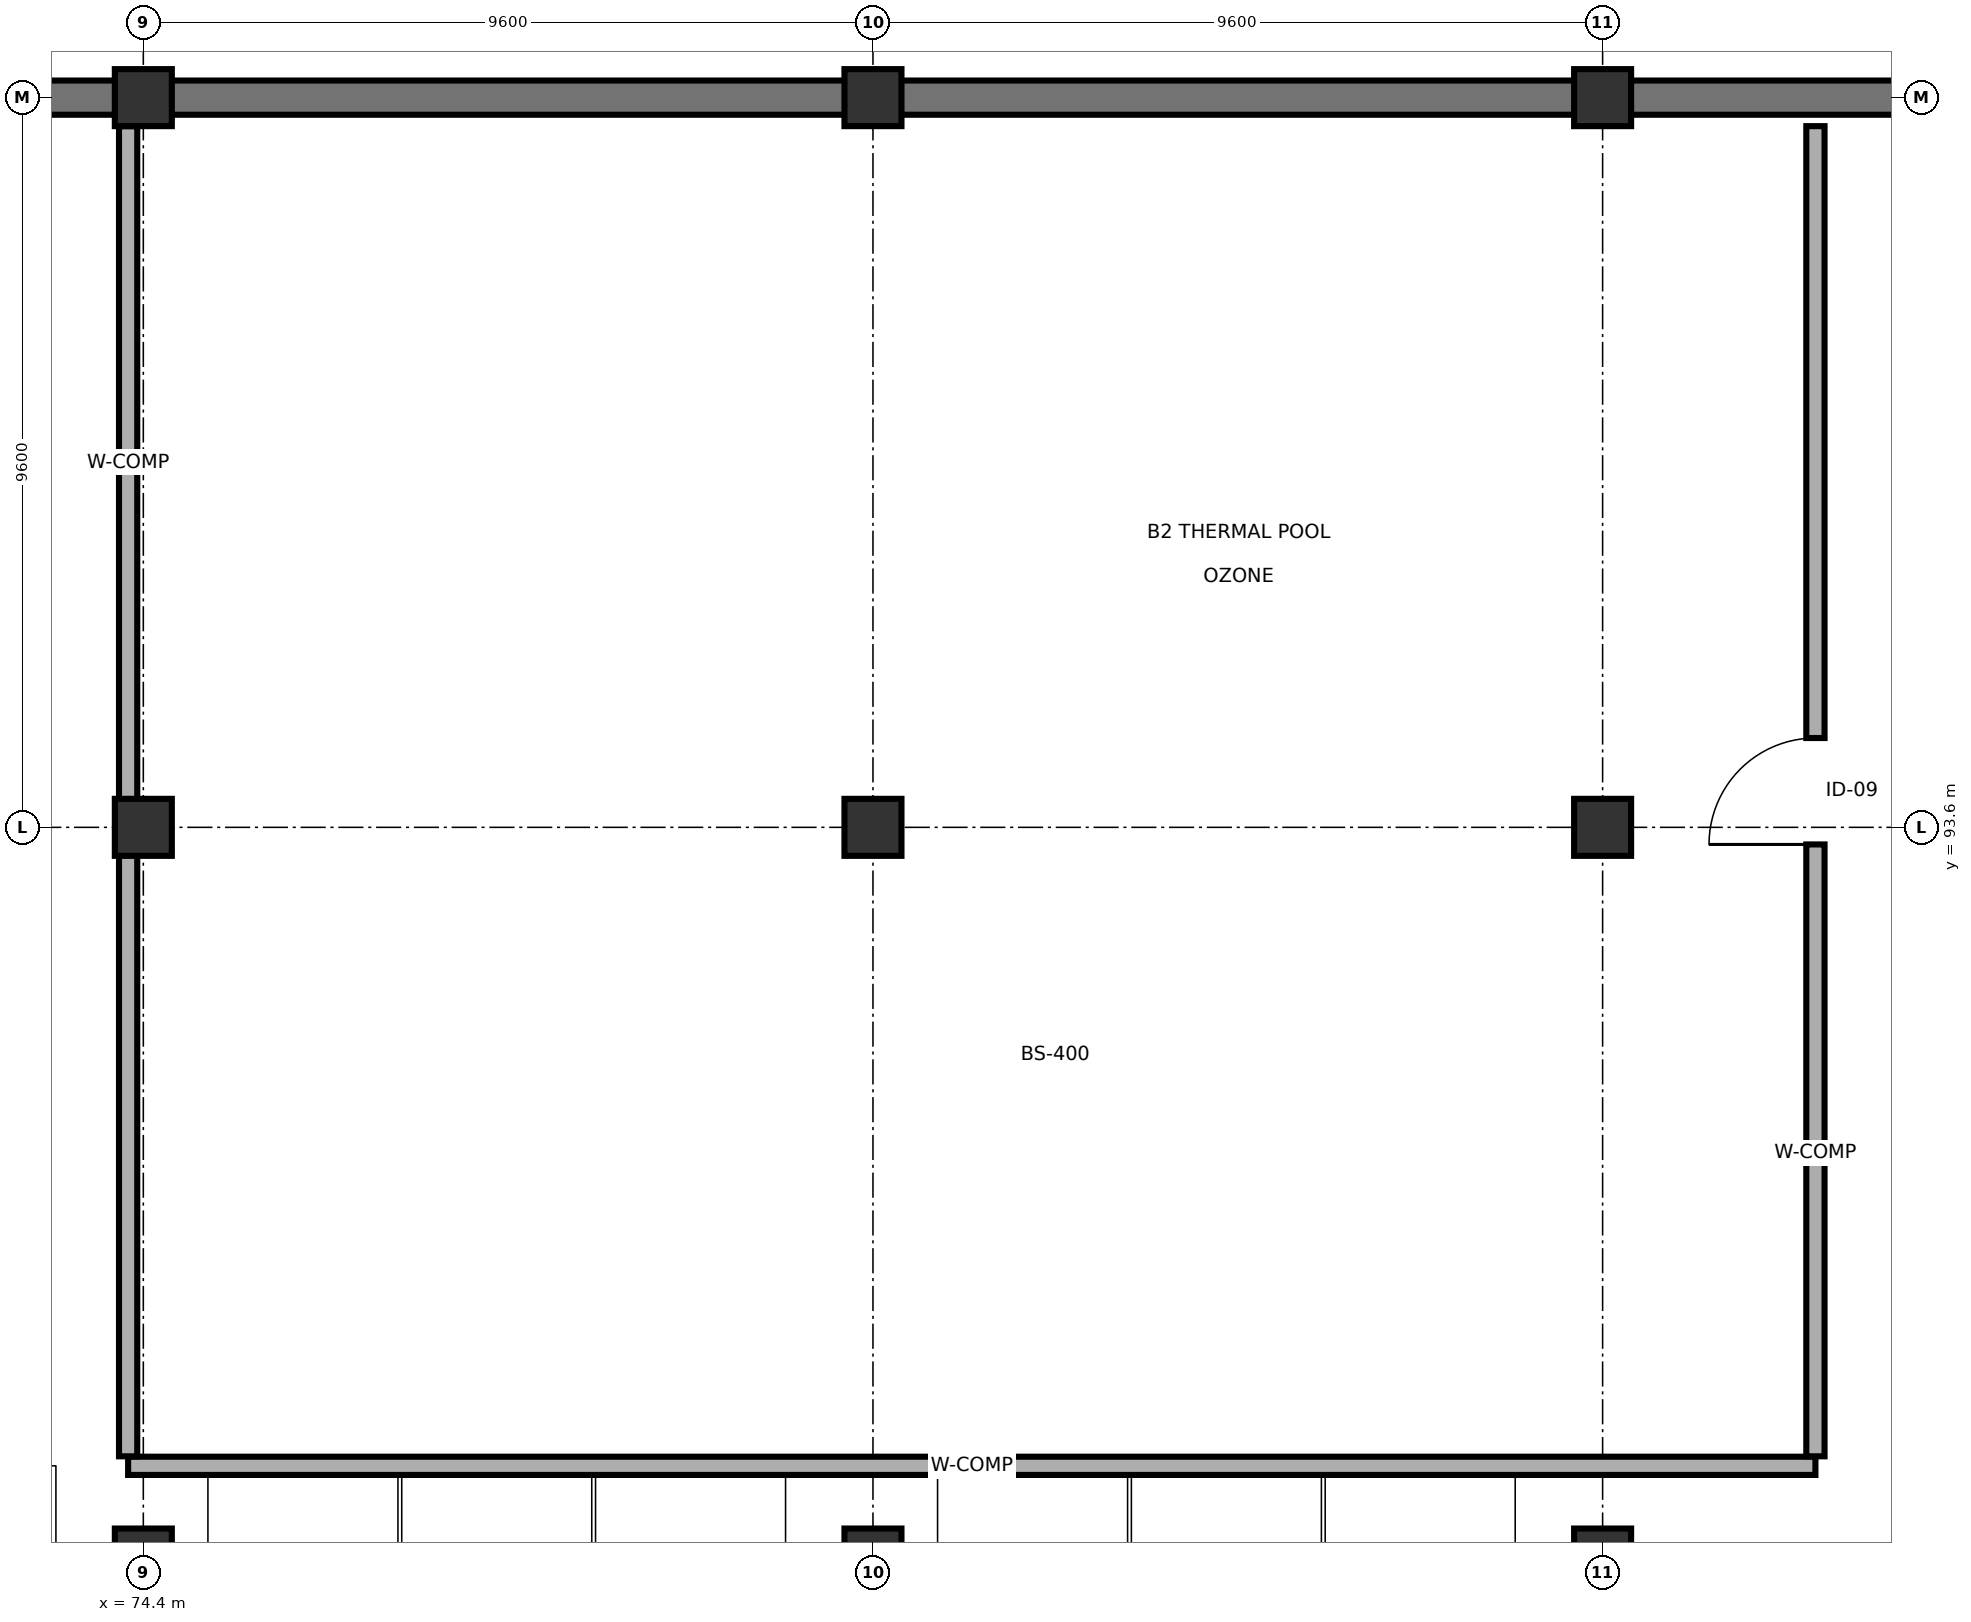
"""IFC4 building model, lengths in metres.
Left out: names, types, materials, properties, quantities, classifications, styles, units other than length and angle.
Written with IfcOpenShell. Run it as: python <this file> out.ifc"""

import sys

from ifc_helpers import new_model, si_unit, direction, frame, frame_2d, origin, origin_2d, place, context, subcontext, project, spatial, rectangle, extrude, element, fill, save


model = new_model("IFC4")
c1 = context("Model", 3, precision=1e-05, world=origin(), true_north=direction((0.0, 1.0)))
c2 = subcontext(c1, "Body", "Model", "MODEL_VIEW")
j1 = project(units=[si_unit("LENGTHUNIT", "METRE"), si_unit("PLANEANGLEUNIT", "RADIAN")], contexts=[c1])
p1 = place(None, origin())
s1 = spatial("IfcSite", under=j1, at=p1, CompositionType="ELEMENT")
p2 = place(p1, origin())
s2 = spatial("IfcBuilding", under=s1, at=p2, CompositionType="ELEMENT")
p3 = place(p2, frame((0.0, 0.0, -8.4)))
s3 = spatial("IfcBuildingStorey", under=s2, at=p3, CompositionType="ELEMENT", Elevation=-8.4)
for number, where, z_axis, x_axis in (
    (1, (74.4, 84.0, 0.0), (0.0, 0.0, 1.0), (1.0, 0.0, 0.0)),
    (2, (74.4, 93.6, 0.0), (0.0, 0.0, 1.0), (1.0, 0.0, 0.0)),
    (3, (74.4, 103.2, 0.0), (0.0, 0.0, 1.0), (1.0, 0.0, 0.0)),
    (4, (84.0, 84.0, 0.0), (0.0, 0.0, 1.0), (1.0, 0.0, 0.0)),
    (5, (84.0, 93.6, 0.0), (0.0, 0.0, 1.0), (1.0, 0.0, 0.0)),
    (6, (84.0, 103.2, 0.0), (0.0, 0.0, 1.0), (1.0, 0.0, 0.0)),
    (7, (93.6, 84.0, 0.0), (0.0, 0.0, 1.0), (1.0, 0.0, 0.0)),
    (8, (93.6, 93.6, 0.0), (0.0, 0.0, 1.0), (1.0, 0.0, 0.0)),
    (9, (93.6, 103.2, 0.0), (0.0, 0.0, 1.0), (1.0, 0.0, 0.0)),
):
    element("IfcColumn", number, at=place(p3, frame(where, z_axis=z_axis, x_axis=x_axis)), inside=s3, PredefinedType="COLUMN", context=c2, shape_type="SweptSolid", body=[
        extrude(rectangle(XDim=0.75, YDim=0.75, at=origin_2d()), origin(), (0.0, 0.0, 1.0), 4.2),
    ])
p4 = place(p3, frame((117.1, 103.2, 0.0), z_axis=(0.0, 0.0, 1.0), x_axis=(-1.0, 0.0, 0.0)))
e10 = element("IfcWall", 10, at=p4, inside=s3, PredefinedType="SOLIDWALL", context=c2, shape_type="SweptSolid", body=[
    extrude(rectangle(XDim=80.6, YDim=0.45, at=frame_2d((40.3, 0.0))), origin(), (0.0, 0.0, 1.0), 3.93),
])
p5 = place(p3, frame((74.2, 85.2, 0.0), z_axis=(0.0, 0.0, 1.0), x_axis=(1.0, 0.0, 0.0)))
e11 = element("IfcWall", 11, at=p5, inside=s3, PredefinedType="SOLIDWALL", context=c2, shape_type="SweptSolid", body=[
    extrude(rectangle(XDim=22.2, YDim=0.24, at=frame_2d((11.1, 0.0))), origin(), (0.0, 0.0, 1.0), 3.415),
])
p6 = place(p3, frame((74.2, 85.325, 0.0), z_axis=(0.0, 0.0, 1.0), x_axis=(0.0, 1.0, 0.0)))
e12 = element("IfcWall", 12, at=p6, inside=s3, PredefinedType="SOLIDWALL", context=c2, shape_type="SweptSolid", body=[
    extrude(rectangle(XDim=17.5, YDim=0.24, at=frame_2d((8.75, 0.0))), origin(), (0.0, 0.0, 1.0), 3.415),
])
p7 = place(p3, frame((96.4, 85.325, 0.0), z_axis=(0.0, 0.0, 1.0), x_axis=(0.0, 1.0, 0.0)))
e13 = element("IfcWall", 13, at=p7, inside=s3, PredefinedType="SOLIDWALL", context=c2, shape_type="SweptSolid", body=[
    extrude(rectangle(XDim=17.5, YDim=0.24, at=frame_2d((8.75, 0.0))), origin(), (0.0, 0.0, 1.0), 3.475),
])
p8 = place(p7, frame((8.05, 0.0, 0.0)))
e14 = element("IfcOpeningElement", 14, at=p8, cuts=e13, PredefinedType="OPENING", context=c2, shape_type="SweptSolid", body=[
    extrude(rectangle(XDim=1.4, YDim=2.2, at=frame_2d((0.7, 1.1))), frame((0.0, 0.13, 0.0), z_axis=(0.0, -1.0, 0.0), x_axis=(1.0, 0.0, 0.0)), (0.0, 0.0, 1.0), 0.26),
])
p9 = place(p8, origin())
e15 = element("IfcDoor", 15, at=p9, inside=s3, OperationType="SINGLE_SWING_LEFT", PredefinedType="DOOR", context=c2, shape_type="SweptSolid", body=[
    extrude(rectangle(XDim=1.4, YDim=2.2, at=frame_2d((0.7, 1.1))), frame((0.0, 0.025, 0.0), z_axis=(0.0, -1.0, 0.0), x_axis=(1.0, 0.0, 0.0)), (0.0, 0.0, 1.0), 0.05),
])
fill(e14, e15)
save(model, sys.argv[1])
